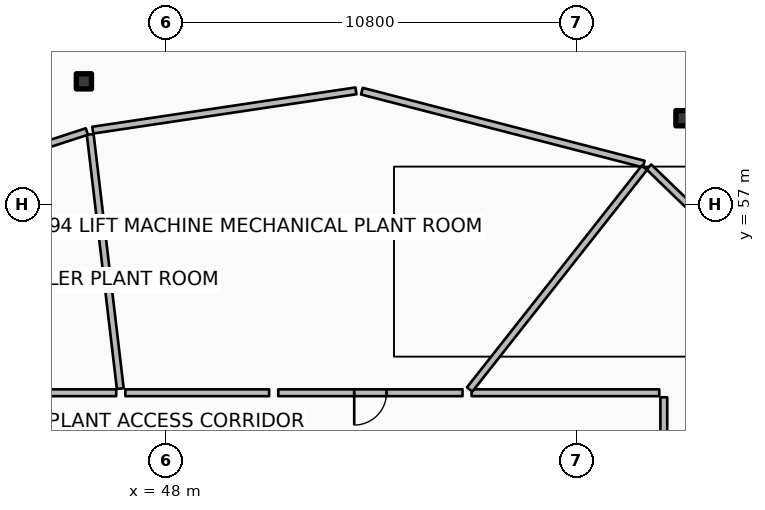
"""IFC4 building model, lengths in metres.
Left out: names, types, materials, properties, quantities, classifications, styles, units other than length and angle.
Written with IfcOpenShell. Run it as: python <this file> out.ifc"""

import sys

from ifc_helpers import new_model, si_unit, direction, frame, frame_2d, origin, origin_2d, place, context, subcontext, project, spatial, rectangle, hollow_rectangle, extrude, element, fill, save


model = new_model("IFC4")
c1 = context("Model", 3, precision=1e-05, world=origin(), true_north=direction((0.0, 1.0)))
c2 = subcontext(c1, "Body", "Model", "MODEL_VIEW")
j1 = project(units=[si_unit("LENGTHUNIT", "METRE"), si_unit("PLANEANGLEUNIT", "RADIAN")], contexts=[c1])
p1 = place(None, origin())
s1 = spatial("IfcSite", under=j1, at=p1, CompositionType="ELEMENT")
p2 = place(p1, origin())
s2 = spatial("IfcBuilding", under=s1, at=p2, CompositionType="ELEMENT")
p3 = place(p2, frame((0.0, 0.0, 374.0)))
s3 = spatial("IfcBuildingStorey", under=s2, at=p3, CompositionType="ELEMENT", Elevation=374.0)
for number, where, z_axis, x_axis in (
    (1, (61.617, 59.274, 0.0), (0.0, 0.0, 1.0), (1.0, 0.0, 0.0)),
    (2, (45.841, 60.244, 0.0), (0.0, 0.0, 1.0), (1.0, 0.0, 0.0)),
):
    element("IfcColumn", number, at=place(p3, frame(where, z_axis=z_axis, x_axis=x_axis)), inside=s3, PredefinedType="COLUMN", context=c2, shape_type="SweptSolid", body=[
        extrude(hollow_rectangle(XDim=0.4, YDim=0.4, WallThickness=0.02, InnerFilletRadius=0.02, OuterFilletRadius=0.04, at=origin_2d()), origin(), (0.0, 0.0, 1.0), 3.36),
    ])
p4 = place(p3, frame((45.24, 61.642, 0.0), z_axis=(0.0, 0.0, 1.0), x_axis=(-0.955241739185, -0.295826333714, 0.0)))
e3 = element("IfcWall", 3, at=p4, inside=s3, PredefinedType="SOLIDWALL", context=c2, shape_type="SweptSolid", body=[
    extrude(rectangle(XDim=4.129, YDim=0.24, at=frame_2d((2.064, 0.0))), origin(), (0.0, 0.0, 1.0), 2.41),
])
p5 = place(p4, frame((1.365, 0.0, 1.35)))
e4 = element("IfcOpeningElement", 4, at=p5, cuts=e3, PredefinedType="OPENING", context=c2, shape_type="SweptSolid", body=[
    extrude(rectangle(XDim=1.4, YDim=0.75, at=frame_2d((0.7, 0.375))), frame((0.0, 0.13, 0.0), z_axis=(0.0, -1.0, 0.0), x_axis=(1.0, 0.0, 0.0)), (0.0, 0.0, 1.0), 0.26),
])
p6 = place(p3, frame((66.467, 52.43, 0.0), z_axis=(0.0, 0.0, 1.0), x_axis=(-0.719364153135, 0.694633151516, 0.0)))
e5 = element("IfcWall", 5, at=p6, inside=s3, PredefinedType="PARTITIONING", context=c2, shape_type="SweptSolid", body=[
    extrude(rectangle(XDim=8.006, YDim=0.18, at=frame_2d((4.003, 0.0))), origin(), (0.0, 0.0, 1.0), 2.8),
])
p7 = place(p3, frame((60.573, 58.066, 0.0), z_axis=(0.0, 0.0, 1.0), x_axis=(-0.968117205342, 0.250497658115, 0.0)))
e6 = element("IfcWall", 6, at=p7, inside=s3, PredefinedType="PARTITIONING", context=c2, shape_type="SweptSolid", body=[
    extrude(rectangle(XDim=7.662, YDim=0.18, at=frame_2d((3.831, 0.0))), origin(), (0.0, 0.0, 1.0), 2.8),
])
p8 = place(p3, frame((52.999, 59.994, 0.0), z_axis=(0.0, 0.0, 1.0), x_axis=(-0.989034336252, -0.147685753256, 0.0)))
e7 = element("IfcWall", 7, at=p8, inside=s3, PredefinedType="PARTITIONING", context=c2, shape_type="SweptSolid", body=[
    extrude(rectangle(XDim=7.003, YDim=0.18, at=frame_2d((3.501, 0.0))), origin(), (0.0, 0.0, 1.0), 2.8),
])
p9 = place(p3, frame((45.918, 58.923, 0.0), z_axis=(0.0, 0.0, 1.0), x_axis=(-0.95105283999, -0.309028308649, 0.0)))
e8 = element("IfcWall", 8, at=p9, inside=s3, PredefinedType="PARTITIONING", context=c2, shape_type="SweptSolid", body=[
    extrude(rectangle(XDim=6.499, YDim=0.18, at=frame_2d((3.25, 0.0))), origin(), (0.0, 0.0, 1.0), 2.8),
])
p10 = place(p3, frame((46.69, 52.05, 0.0), z_axis=(0.0, 0.0, 1.0), x_axis=(-1.0, 0.0, 0.0)))
e9 = element("IfcWall", 9, at=p10, inside=s3, PredefinedType="PARTITIONING", context=c2, shape_type="SweptSolid", body=[
    extrude(rectangle(XDim=4.199, YDim=0.18, at=frame_2d((2.099, 0.0))), origin(), (0.0, 0.0, 1.0), 2.8),
])
p11 = place(p3, frame((46.798, 52.159, 0.0), z_axis=(0.0, 0.0, 1.0), x_axis=(-0.117541495417, 0.993067971921, 0.0)))
e10 = element("IfcWall", 10, at=p11, inside=s3, PredefinedType="PARTITIONING", context=c2, shape_type="SweptSolid", body=[
    extrude(rectangle(XDim=6.736, YDim=0.18, at=frame_2d((3.368, 0.0))), origin(), (0.0, 0.0, 1.0), 2.8),
])
p12 = place(p3, frame((61.1, 49.456, 0.0), z_axis=(0.0, 0.0, 1.0), x_axis=(0.0, 1.0, 0.0)))
e11 = element("IfcWall", 11, at=p12, inside=s3, PredefinedType="PARTITIONING", context=c2, shape_type="SweptSolid", body=[
    extrude(rectangle(XDim=2.474, YDim=0.18, at=frame_2d((1.237, 0.0))), origin(), (0.0, 0.0, 1.0), 2.8),
])
p13 = place(p3, frame((60.98, 52.05, 0.0), z_axis=(0.0, 0.0, 1.0), x_axis=(-1.0, 0.0, 0.0)))
e12 = element("IfcWall", 12, at=p13, inside=s3, PredefinedType="PARTITIONING", context=c2, shape_type="SweptSolid", body=[
    extrude(rectangle(XDim=4.937, YDim=0.18, at=frame_2d((2.469, 0.0))), origin(), (0.0, 0.0, 1.0), 2.8),
])
p14 = place(p3, frame((55.991, 52.136, 0.0), z_axis=(0.0, 0.0, 1.0), x_axis=(0.619089811342, 0.785320192974, 0.0)))
e13 = element("IfcWall", 13, at=p14, inside=s3, PredefinedType="PARTITIONING", context=c2, shape_type="SweptSolid", body=[
    extrude(rectangle(XDim=7.426, YDim=0.18, at=frame_2d((3.713, 0.0))), origin(), (0.0, 0.0, 1.0), 2.8),
])
p15 = place(p3, frame((55.803, 52.05, 0.0), z_axis=(0.0, 0.0, 1.0), x_axis=(-1.0, 0.0, 0.0)))
e14 = element("IfcWall", 14, at=p15, inside=s3, PredefinedType="PARTITIONING", context=c2, shape_type="SweptSolid", body=[
    extrude(rectangle(XDim=4.848, YDim=0.18, at=frame_2d((2.424, 0.0))), origin(), (0.0, 0.0, 1.0), 2.8),
])
p16 = place(p15, frame((1.999, 0.0, 0.0)))
e15 = element("IfcOpeningElement", 15, at=p16, cuts=e14, PredefinedType="OPENING", context=c2, shape_type="SweptSolid", body=[
    extrude(rectangle(XDim=0.85, YDim=2.06, at=frame_2d((0.425, 1.03))), frame((0.0, 0.1, 0.0), z_axis=(0.0, -1.0, 0.0), x_axis=(1.0, 0.0, 0.0)), (0.0, 0.0, 1.0), 0.2),
])
p17 = place(p3, frame((50.714, 52.05, 0.0), z_axis=(0.0, 0.0, 1.0), x_axis=(-1.0, 0.0, 0.0)))
e16 = element("IfcWall", 16, at=p17, inside=s3, PredefinedType="PARTITIONING", context=c2, shape_type="SweptSolid", body=[
    extrude(rectangle(XDim=3.784, YDim=0.18, at=frame_2d((1.892, 0.0))), origin(), (0.0, 0.0, 1.0), 2.8),
])
p18 = place(p16, origin())
e17 = element("IfcDoor", 17, at=p18, inside=s3, OperationType="SINGLE_SWING_RIGHT", PredefinedType="DOOR", context=c2, shape_type="SweptSolid", body=[
    extrude(rectangle(XDim=0.85, YDim=2.06, at=frame_2d((0.425, 1.03))), frame((0.0, 0.025, 0.0), z_axis=(0.0, -1.0, 0.0), x_axis=(1.0, 0.0, 0.0)), (0.0, 0.0, 1.0), 0.05),
])
fill(e15, e17)
save(model, sys.argv[1])
